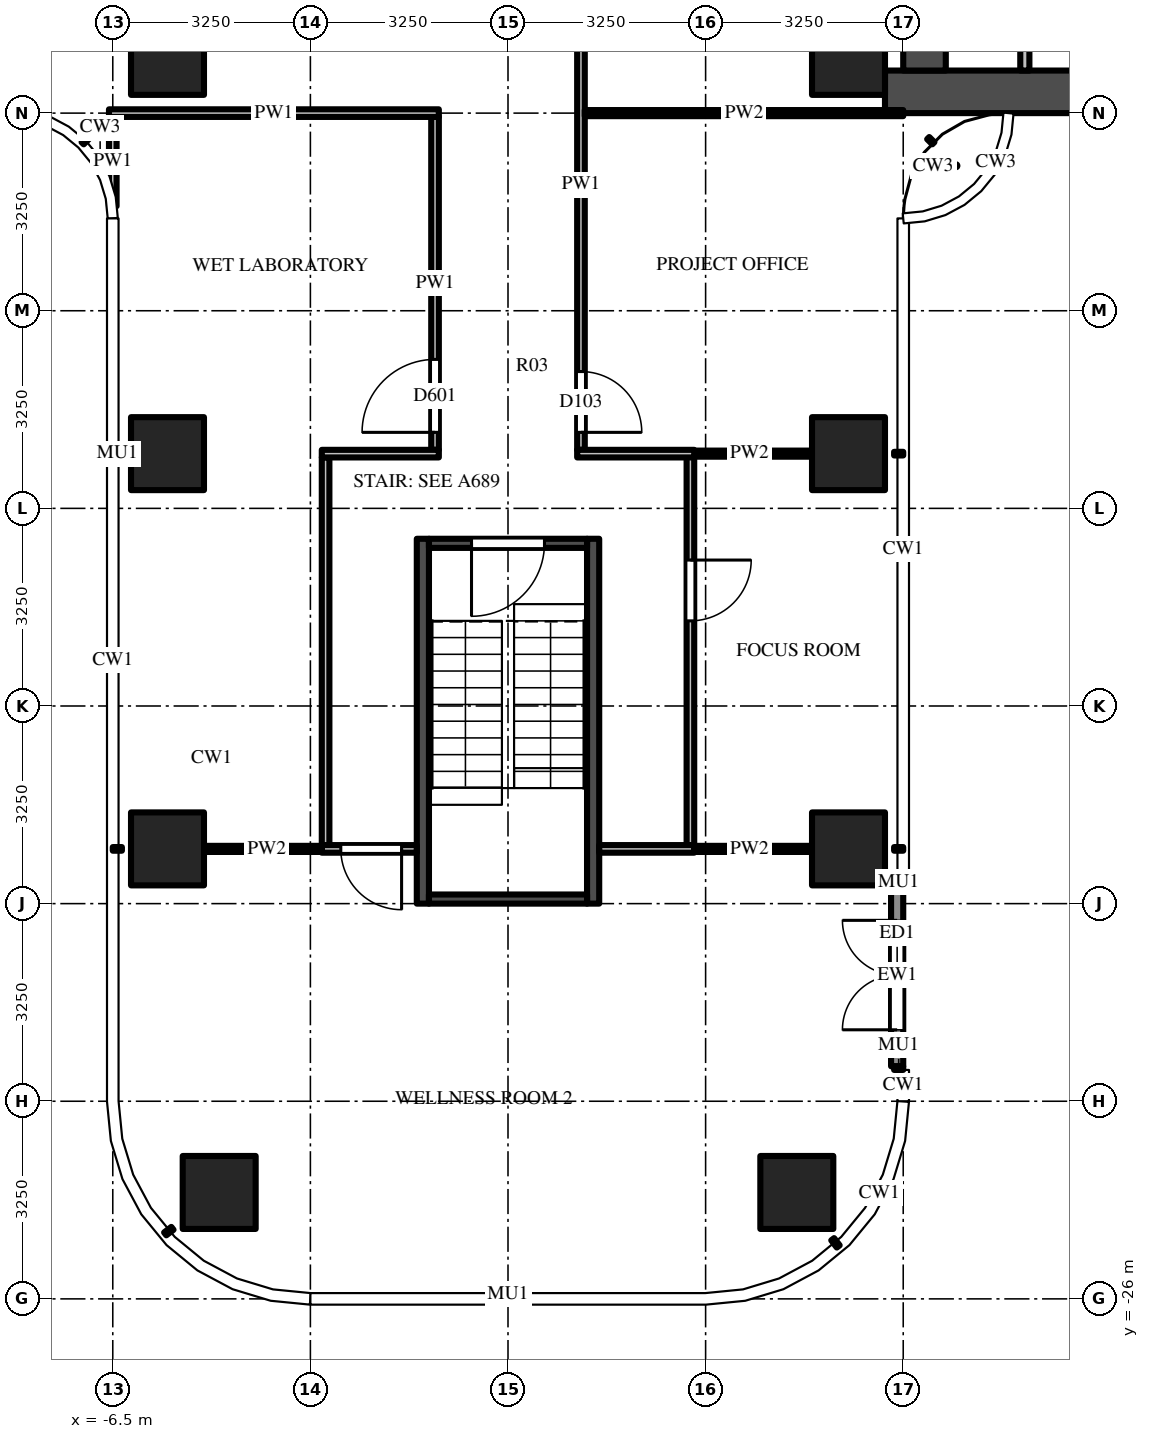
"""IFC4 building model, lengths in metres.
Left out: names, types, materials, properties, quantities, classifications, styles, units other than length and angle.
Written with IfcOpenShell. Run it as: python <this file> out.ifc"""

import sys

from ifc_helpers import new_model, si_unit, direction, frame, frame_2d, origin, origin_2d, place, context, subcontext, project, spatial, rectangle, extrude, source, transform, mapped, element, fill, save


model = new_model("IFC4")
c1 = context("Model", 3, precision=1e-05, world=origin(), true_north=direction((0.0, 1.0)))
c2 = subcontext(c1, "Body", "Model", "MODEL_VIEW")
j1 = project(units=[si_unit("LENGTHUNIT", "METRE"), si_unit("PLANEANGLEUNIT", "RADIAN")], contexts=[c1])
p1 = place(None, origin())
s1 = spatial("IfcSite", under=j1, at=p1, CompositionType="ELEMENT")
p2 = place(p1, origin())
s2 = spatial("IfcBuilding", under=s1, at=p2, CompositionType="ELEMENT")
p3 = place(p2, frame((0.0, 0.0, 204.9)))
s3 = spatial("IfcBuildingStorey", under=s2, at=p3, CompositionType="ELEMENT", Elevation=204.9)
m1 = source(origin(), c2, "Body", "SweptSolid", [
    extrude(rectangle(XDim=1.2, YDim=1.2, at=origin_2d()), origin(), (0.0, 0.0, 1.0), 3.9),
])
for number, where, z_axis, x_axis in (
    (1, (5.6, -5.6, 0.0), (0.0, 0.0, 1.0), (1.0, 0.0, 0.0)),
    (2, (-5.6, -5.6, 0.0), (0.0, 0.0, 1.0), (1.0, 0.0, 0.0)),
    (3, (5.6, -12.1, 0.0), (0.0, 0.0, 1.0), (1.0, 0.0, 0.0)),
    (4, (5.6, -18.6, 0.0), (0.0, 0.0, 1.0), (1.0, 0.0, 0.0)),
    (5, (4.75, -24.25, 0.0), (0.0, 0.0, 1.0), (1.0, 0.0, 0.0)),
    (6, (-5.6, -12.1, 0.0), (0.0, 0.0, 1.0), (1.0, 0.0, 0.0)),
    (7, (-5.6, -18.6, 0.0), (0.0, 0.0, 1.0), (1.0, 0.0, 0.0)),
    (8, (-4.75, -24.25, 0.0), (0.0, 0.0, 1.0), (1.0, 0.0, 0.0)),
):
    element("IfcColumn", number, at=place(p3, frame(where, z_axis=z_axis, x_axis=x_axis)), inside=s3, PredefinedType="COLUMN", context=c2, shape_type="MappedRepresentation", body=[
        mapped(m1, transform((0.0, 0.0, 0.0))),
    ])
m2 = source(origin(), c2, "Body", "SweptSolid", [
    extrude(rectangle(XDim=16.55, YDim=0.7, at=frame_2d((8.275, 0.0))), origin(), (0.0, 0.0, 1.0), 3.7),
])
p4 = place(p3, frame((6.2, -6.15, 0.0), z_axis=(0.0, 0.0, 1.0), x_axis=(1.0, 0.0, 0.0)))
e9 = element("IfcWall", 9, at=p4, inside=s3, PredefinedType="SHEAR", context=c2, shape_type="MappedRepresentation", body=[
    mapped(m2, transform((0.0, 0.0, 0.0))),
])
m3 = source(origin(), c2, "Body", "SweptSolid", [
    extrude(rectangle(XDim=9.05, YDim=0.7, at=frame_2d((4.525, 0.0))), origin(), (0.0, 0.0, 1.0), 3.7),
])
p5 = place(p3, frame((6.85, -5.8, 0.0), z_axis=(0.0, 0.0, 1.0), x_axis=(0.0, 1.0, 0.0)))
e10 = element("IfcWall", 10, at=p5, inside=s3, PredefinedType="SHEAR", context=c2, shape_type="MappedRepresentation", body=[
    mapped(m3, transform((0.0, 0.0, 0.0))),
])
m4 = source(origin(), c2, "Body", "SweptSolid", [
    extrude(rectangle(XDim=1.8, YDim=2.1, at=frame_2d((0.9, 1.05))), frame((0.0, 0.36, 0.0), z_axis=(0.0, -1.0, 0.0), x_axis=(1.0, 0.0, 0.0)), (0.0, 0.0, 1.0), 0.72),
])
p6 = place(p5, frame((3.15, 0.0, 0.0)))
e11 = element("IfcOpeningElement", 11, at=p6, cuts=e10, PredefinedType="OPENING", context=c2, shape_type="MappedRepresentation", body=[
    mapped(m4, transform((0.0, 0.0, 0.0))),
])
m5 = source(origin(), c2, "Body", "SweptSolid", [
    extrude(rectangle(XDim=2.2, YDim=0.15, at=frame_2d((1.1, 0.0))), origin(), (0.0, 0.0, 1.0), 3.7),
])
p7 = place(p3, frame((8.5, -5.8, 0.0), z_axis=(0.0, 0.0, 1.0), x_axis=(0.0, 1.0, 0.0)))
e12 = element("IfcWall", 12, at=p7, inside=s3, PredefinedType="PARTITIONING", context=c2, shape_type="MappedRepresentation", body=[
    mapped(m5, transform((0.0, 0.0, 0.0))),
])
m6 = source(origin(), c2, "Body", "SweptSolid", [
    extrude(rectangle(XDim=6.0, YDim=0.2, at=frame_2d((3.0, 0.0))), origin(), (0.0, 0.0, 1.0), 3.7),
])
for number, where, z_axis, x_axis in (
    (13, (1.4, -13.5, 0.0), (0.0, 0.0, 1.0), (0.0, -1.0, 0.0)),
    (14, (-1.4, -13.5, 0.0), (0.0, 0.0, 1.0), (0.0, -1.0, 0.0)),
):
    element("IfcWall", number, at=place(p3, frame(where, z_axis=z_axis, x_axis=x_axis)), inside=s3, PredefinedType="SHEAR", context=c2, shape_type="MappedRepresentation", body=[
        mapped(m6, transform((0.0, 0.0, 0.0))),
    ])
m7 = source(origin(), c2, "Body", "SweptSolid", [
    extrude(rectangle(XDim=2.6, YDim=0.15, at=frame_2d((1.3, 0.0))), origin(), (0.0, 0.0, 1.0), 3.7),
])
p8 = place(p3, frame((1.3, -13.575, 0.0), z_axis=(0.0, 0.0, 1.0), x_axis=(-1.0, 0.0, 0.0)))
e15 = element("IfcWall", 15, at=p8, inside=s3, PredefinedType="SHEAR", context=c2, shape_type="MappedRepresentation", body=[
    mapped(m7, transform((0.0, 0.0, 0.0))),
])
m8 = source(origin(), c2, "Body", "SweptSolid", [
    extrude(rectangle(XDim=1.2, YDim=2.1, at=frame_2d((0.6, 1.05))), frame((0.0, 0.085, 0.0), z_axis=(0.0, -1.0, 0.0), x_axis=(1.0, 0.0, 0.0)), (0.0, 0.0, 1.0), 0.17),
])
p9 = place(p8, frame((0.7, 0.0, 0.0)))
e16 = element("IfcOpeningElement", 16, at=p9, cuts=e15, PredefinedType="OPENING", context=c2, shape_type="MappedRepresentation", body=[
    mapped(m8, transform((0.0, 0.0, 0.0))),
])
p10 = place(p3, frame((1.3, -19.425, 0.0), z_axis=(0.0, 0.0, 1.0), x_axis=(-1.0, 0.0, 0.0)))
e17 = element("IfcWall", 17, at=p10, inside=s3, PredefinedType="SHEAR", context=c2, shape_type="MappedRepresentation", body=[
    mapped(m7, transform((0.0, 0.0, 0.0))),
])
m9 = source(origin(), c2, "Body", "SweptSolid", [
    extrude(rectangle(XDim=3.0, YDim=0.2, at=frame_2d((1.5, 0.0))), origin(), (0.0, 0.0, 1.0), 3.7),
])
p11 = place(p3, frame((6.4, -22.175, 0.0), z_axis=(0.0, 0.0, 1.0), x_axis=(0.0, 1.0, 0.0)))
e18 = element("IfcWall", 18, at=p11, inside=s3, PredefinedType="SOLIDWALL", context=c2, shape_type="MappedRepresentation", body=[
    mapped(m9, transform((0.0, 0.0, 0.0))),
])
m10 = source(origin(), c2, "Body", "SweptSolid", [
    extrude(rectangle(XDim=1.8, YDim=2.4, at=frame_2d((0.9, 1.2))), frame((0.0, 0.11, 0.0), z_axis=(0.0, -1.0, 0.0), x_axis=(1.0, 0.0, 0.0)), (0.0, 0.0, 1.0), 0.22),
])
p12 = place(p11, frame((0.6, 0.0, 0.0)))
e19 = element("IfcOpeningElement", 19, at=p12, cuts=e18, PredefinedType="OPENING", context=c2, shape_type="MappedRepresentation", body=[
    mapped(m10, transform((0.0, 0.0, 0.0))),
])
m11 = source(origin(), c2, "Body", "SweptSolid", [
    extrude(rectangle(XDim=1.469, YDim=0.125, at=frame_2d((0.734, 0.0))), origin(), (0.0, 0.0, 1.0), 3.7),
])
p13 = place(p3, frame((-6.5, -6.562, 0.0), z_axis=(0.0, 0.0, 1.0), x_axis=(0.0, -1.0, 0.0)))
e20 = element("IfcWall", 20, at=p13, inside=s3, PredefinedType="PARTITIONING", context=c2, shape_type="MappedRepresentation", body=[
    mapped(m11, transform((0.0, 0.0, 0.0))),
])
m12 = source(origin(), c2, "Body", "SweptSolid", [
    extrude(rectangle(XDim=6.387, YDim=0.125, at=frame_2d((3.194, 0.0))), origin(), (0.0, 0.0, 1.0), 2.997),
])
p14 = place(p3, frame((-3.0, -18.55, 0.0), z_axis=(0.0, 0.0, 1.0), x_axis=(0.0, 1.0, 0.0)))
e21 = element("IfcWall", 21, at=p14, inside=s3, PredefinedType="PARTITIONING", context=c2, shape_type="MappedRepresentation", body=[
    mapped(m12, transform((0.0, 0.0, 0.0))),
])
m13 = source(origin(), c2, "Body", "SweptSolid", [
    extrude(rectangle(XDim=5.475, YDim=0.125, at=frame_2d((2.738, 0.0))), origin(), (0.0, 0.0, 1.0), 2.997),
])
p15 = place(p3, frame((-1.2, -12.038, 0.0), z_axis=(0.0, 0.0, 1.0), x_axis=(0.0, 1.0, 0.0)))
e22 = element("IfcWall", 22, at=p15, inside=s3, PredefinedType="PARTITIONING", context=c2, shape_type="MappedRepresentation", body=[
    mapped(m13, transform((0.0, 0.0, 0.0))),
])
m14 = source(origin(), c2, "Body", "SweptSolid", [
    extrude(rectangle(XDim=1.2, YDim=2.1, at=frame_2d((0.6, 1.05))), frame((0.0, 0.073, 0.0), z_axis=(0.0, -1.0, 0.0), x_axis=(1.0, 0.0, 0.0)), (0.0, 0.0, 1.0), 0.145),
])
p16 = place(p15, frame((0.288, 0.0, 0.0)))
e23 = element("IfcOpeningElement", 23, at=p16, cuts=e22, PredefinedType="OPENING", context=c2, shape_type="MappedRepresentation", body=[
    mapped(m14, transform((0.0, 0.0, 0.0))),
])
m15 = source(origin(), c2, "Body", "SweptSolid", [
    extrude(rectangle(XDim=8.725, YDim=0.125, at=frame_2d((4.363, 0.0))), origin(), (0.0, 0.0, 1.0), 2.997),
])
p17 = place(p3, frame((1.2, -3.312, 0.0), z_axis=(0.0, 0.0, 1.0), x_axis=(0.0, -1.0, 0.0)))
e24 = element("IfcWall", 24, at=p17, inside=s3, PredefinedType="PARTITIONING", context=c2, shape_type="MappedRepresentation", body=[
    mapped(m15, transform((0.0, 0.0, 0.0))),
])
m16 = source(origin(), c2, "Body", "SweptSolid", [
    extrude(rectangle(XDim=1.0, YDim=2.1, at=frame_2d((0.5, 1.05))), frame((0.0, 0.073, 0.0), z_axis=(0.0, -1.0, 0.0), x_axis=(1.0, 0.0, 0.0)), (0.0, 0.0, 1.0), 0.145),
])
p18 = place(p17, frame((7.438, 0.0, 0.0)))
e25 = element("IfcOpeningElement", 25, at=p18, cuts=e24, PredefinedType="OPENING", context=c2, shape_type="MappedRepresentation", body=[
    mapped(m16, transform((0.0, 0.0, 0.0))),
])
m17 = source(origin(), c2, "Body", "SweptSolid", [
    extrude(rectangle(XDim=6.4, YDim=0.125, at=frame_2d((3.2, 0.0))), origin(), (0.0, 0.0, 1.0), 2.997),
])
p19 = place(p3, frame((3.0, -12.15, 0.0), z_axis=(0.0, 0.0, 1.0), x_axis=(0.0, -1.0, 0.0)))
e26 = element("IfcWall", 26, at=p19, inside=s3, PredefinedType="PARTITIONING", context=c2, shape_type="MappedRepresentation", body=[
    mapped(m17, transform((0.0, 0.0, 0.0))),
])
p20 = place(p19, frame((1.7, 0.0, 0.0)))
e27 = element("IfcOpeningElement", 27, at=p20, cuts=e26, PredefinedType="OPENING", context=c2, shape_type="MappedRepresentation", body=[
    mapped(m16, transform((0.0, 0.0, 0.0))),
])
m18 = source(origin(), c2, "Body", "SweptSolid", [
    extrude(rectangle(XDim=2.062, YDim=0.1, at=frame_2d((1.031, 0.0))), origin(), (0.0, 0.0, 1.0), 3.223),
])
for number, where, z_axis, x_axis in (
    (28, (-5.0, -18.6, 0.0), (0.0, 0.0, 1.0), (1.0, 0.0, 0.0)),
    (29, (2.938, -18.6, 0.0), (0.0, 0.0, 1.0), (1.0, 0.0, 0.0)),
):
    element("IfcWall", number, at=place(p3, frame(where, z_axis=z_axis, x_axis=x_axis)), inside=s3, PredefinedType="PARTITIONING", context=c2, shape_type="MappedRepresentation", body=[
        mapped(m18, transform((0.0, 0.0, 0.0))),
    ])
m19 = source(origin(), c2, "Body", "SweptSolid", [
    extrude(rectangle(XDim=1.562, YDim=0.125, at=frame_2d((0.781, 0.0))), origin(), (0.0, 0.0, 1.0), 3.223),
])
p21 = place(p3, frame((-1.5, -18.6, 0.0), z_axis=(0.0, 0.0, 1.0), x_axis=(-1.0, 0.0, 0.0)))
e30 = element("IfcWall", 30, at=p21, inside=s3, PredefinedType="PARTITIONING", context=c2, shape_type="MappedRepresentation", body=[
    mapped(m19, transform((0.0, 0.0, 0.0))),
])
p22 = place(p21, frame((0.25, 0.0, 0.0)))
e31 = element("IfcOpeningElement", 31, at=p22, cuts=e30, PredefinedType="OPENING", context=c2, shape_type="MappedRepresentation", body=[
    mapped(m16, transform((0.0, 0.0, 0.0))),
])
p23 = place(p3, frame((3.062, -18.6, 0.0), z_axis=(0.0, 0.0, 1.0), x_axis=(-1.0, 0.0, 0.0)))
e32 = element("IfcWall", 32, at=p23, inside=s3, PredefinedType="PARTITIONING", context=c2, shape_type="MappedRepresentation", body=[
    mapped(m19, transform((0.0, 0.0, 0.0))),
])
m20 = source(origin(), c2, "Body", "SweptSolid", [
    extrude(rectangle(XDim=2.062, YDim=0.1, at=frame_2d((1.031, 0.0))), origin(), (0.0, 0.0, 1.0), 2.997),
])
p24 = place(p3, frame((2.938, -12.1, 0.0), z_axis=(0.0, 0.0, 1.0), x_axis=(1.0, 0.0, 0.0)))
e33 = element("IfcWall", 33, at=p24, inside=s3, PredefinedType="PARTITIONING", context=c2, shape_type="MappedRepresentation", body=[
    mapped(m20, transform((0.0, 0.0, 0.0))),
])
m21 = source(origin(), c2, "Body", "SweptSolid", [
    extrude(rectangle(XDim=1.925, YDim=0.125, at=frame_2d((0.962, 0.0))), origin(), (0.0, 0.0, 1.0), 2.997),
])
for number, where, z_axis, x_axis in (
    (34, (-3.062, -12.1, 0.0), (0.0, 0.0, 1.0), (1.0, 0.0, 0.0)),
    (35, (1.137, -12.1, 0.0), (0.0, 0.0, 1.0), (1.0, 0.0, 0.0)),
):
    element("IfcWall", number, at=place(p3, frame(where, z_axis=z_axis, x_axis=x_axis)), inside=s3, PredefinedType="PARTITIONING", context=c2, shape_type="MappedRepresentation", body=[
        mapped(m21, transform((0.0, 0.0, 0.0))),
    ])
m22 = source(origin(), c2, "Body", "SweptSolid", [
    extrude(rectangle(XDim=5.238, YDim=0.1, at=frame_2d((2.619, 0.0))), origin(), (0.0, 0.0, 1.0), 2.78),
])
p25 = place(p3, frame((1.262, -6.5, 0.0), z_axis=(0.0, 0.0, 1.0), x_axis=(1.0, 0.0, 0.0)))
e36 = element("IfcWall", 36, at=p25, inside=s3, PredefinedType="PARTITIONING", context=c2, shape_type="MappedRepresentation", body=[
    mapped(m22, transform((0.0, 0.0, 0.0))),
])
m23 = source(origin(), c2, "Body", "SweptSolid", [
    extrude(rectangle(XDim=5.425, YDim=0.125, at=frame_2d((2.712, 0.0))), origin(), (0.0, 0.0, 1.0), 2.78),
])
p26 = place(p3, frame((-1.137, -6.5, 0.0), z_axis=(0.0, 0.0, 1.0), x_axis=(-1.0, 0.0, 0.0)))
e37 = element("IfcWall", 37, at=p26, inside=s3, PredefinedType="PARTITIONING", context=c2, shape_type="MappedRepresentation", body=[
    mapped(m23, transform((0.0, 0.0, 0.0))),
])
m24 = source(origin(), c2, "Body", "SweptSolid", [
    extrude(rectangle(XDim=1.2, YDim=2.1, at=frame_2d((0.6, 1.05))), frame((0.0, 0.025, 0.0), z_axis=(0.0, -1.0, 0.0), x_axis=(1.0, 0.0, 0.0)), (0.0, 0.0, 1.0), 0.05),
])
p27 = place(p9, origin())
e38 = element("IfcDoor", 38, at=p27, inside=s3, OperationType="SINGLE_SWING_RIGHT", PredefinedType="DOOR", context=c2, shape_type="MappedRepresentation", body=[
    mapped(m24, transform((0.0, 0.0, 0.0))),
])
fill(e16, e38)
m25 = source(origin(), c2, "Body", "SweptSolid", [
    extrude(rectangle(XDim=1.8, YDim=2.4, at=frame_2d((0.9, 1.2))), frame((0.0, 0.025, 0.0), z_axis=(0.0, -1.0, 0.0), x_axis=(1.0, 0.0, 0.0)), (0.0, 0.0, 1.0), 0.05),
])
p28 = place(p12, origin())
e39 = element("IfcDoor", 39, at=p28, inside=s3, OperationType="DOUBLE_DOOR_SINGLE_SWING", PredefinedType="DOOR", context=c2, shape_type="MappedRepresentation", body=[
    mapped(m25, transform((0.0, 0.0, 0.0))),
])
fill(e19, e39)
m26 = source(origin(), c2, "Body", "SweptSolid", [
    extrude(rectangle(XDim=1.0, YDim=2.1, at=frame_2d((0.5, 1.05))), frame((0.0, 0.025, 0.0), z_axis=(0.0, -1.0, 0.0), x_axis=(1.0, 0.0, 0.0)), (0.0, 0.0, 1.0), 0.05),
])
p29 = place(p22, origin())
e40 = element("IfcDoor", 40, at=p29, inside=s3, OperationType="SINGLE_SWING_LEFT", PredefinedType="DOOR", context=c2, shape_type="MappedRepresentation", body=[
    mapped(m26, transform((0.0, 0.0, 0.0))),
])
fill(e31, e40)
p30 = place(p20, origin())
e41 = element("IfcDoor", 41, at=p30, inside=s3, OperationType="SINGLE_SWING_LEFT", PredefinedType="DOOR", context=c2, shape_type="MappedRepresentation", body=[
    mapped(m26, transform((0.0, 0.0, 0.0))),
])
fill(e27, e41)
p31 = place(p18, origin())
e42 = element("IfcDoor", 42, at=p31, inside=s3, OperationType="SINGLE_SWING_RIGHT", PredefinedType="DOOR", context=c2, shape_type="MappedRepresentation", body=[
    mapped(m26, transform((0.0, 0.0, 0.0))),
])
fill(e25, e42)
p32 = place(p16, origin())
e43 = element("IfcDoor", 43, at=p32, inside=s3, OperationType="SINGLE_SWING_LEFT", PredefinedType="DOOR", context=c2, shape_type="MappedRepresentation", body=[
    mapped(m24, transform((0.0, 0.0, 0.0))),
])
fill(e23, e43)
save(model, sys.argv[1])
